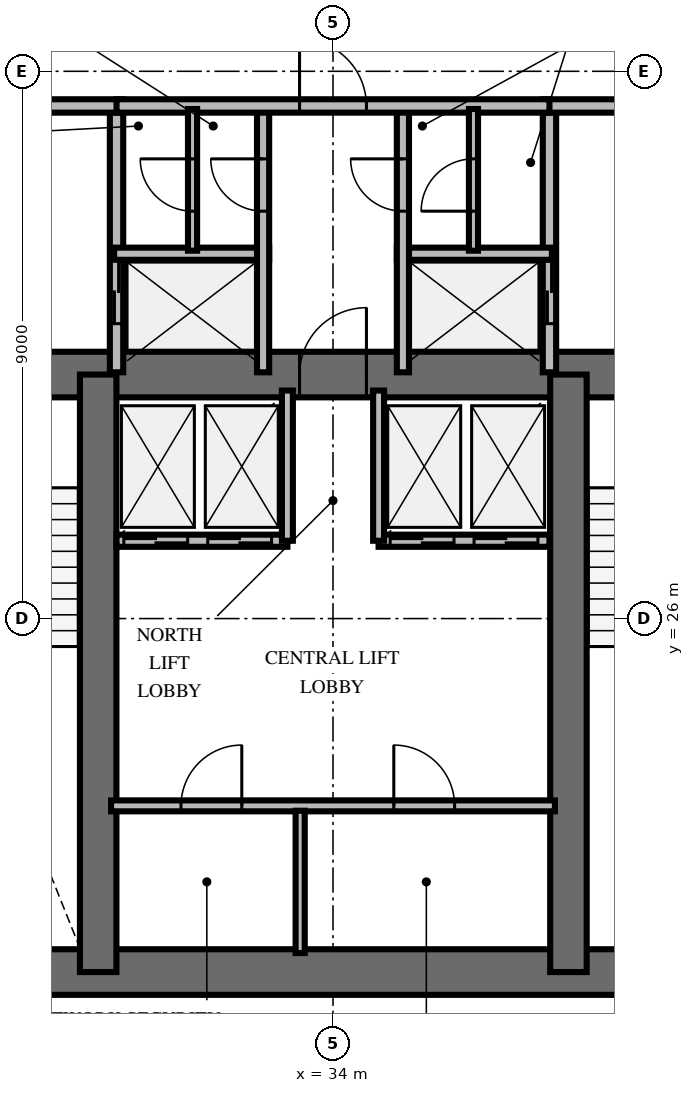
"""IFC4 building model, lengths in metres.
Left out: names, types, materials, properties, quantities, classifications, styles, units other than length and angle.
Written with IfcOpenShell. Run it as: python <this file> out.ifc"""

import sys

from ifc_helpers import new_model, si_unit, direction, frame, frame_2d, origin, place, context, subcontext, project, spatial, rectangle, extrude, element, fill, save


model = new_model("IFC4")
c1 = context("Model", 3, precision=1e-05, world=origin(), true_north=direction((0.0, 1.0)))
c2 = subcontext(c1, "Body", "Model", "MODEL_VIEW")
j1 = project(units=[si_unit("LENGTHUNIT", "METRE"), si_unit("PLANEANGLEUNIT", "RADIAN")], contexts=[c1])
p1 = place(None, origin())
s1 = spatial("IfcSite", under=j1, at=p1, CompositionType="ELEMENT")
p2 = place(p1, origin())
s2 = spatial("IfcBuilding", under=s1, at=p2, CompositionType="ELEMENT")
p3 = place(p2, frame((0.0, 0.0, 180.8)))
s3 = spatial("IfcBuildingStorey", under=s2, at=p3, CompositionType="ELEMENT", Elevation=180.8)
p4 = place(p3, frame((26.072, 20.187, 0.0), z_axis=(0.0, 0.0, 1.0), x_axis=(1.0, 0.0, 0.0)))
e1 = element("IfcWall", 1, at=p4, inside=s3, PredefinedType="SHEAR", context=c2, shape_type="SweptSolid", body=[
    extrude(rectangle(XDim=15.866, YDim=0.75, at=frame_2d((7.933, 0.0))), origin(), (0.0, 0.0, 1.0), 3.6),
])
p5 = place(p3, frame((26.072, 30.013, 0.0), z_axis=(0.0, 0.0, 1.0), x_axis=(1.0, 0.0, 0.0)))
e2 = element("IfcWall", 2, at=p5, inside=s3, PredefinedType="SHEAR", context=c2, shape_type="SweptSolid", body=[
    extrude(rectangle(XDim=15.866, YDim=0.75, at=frame_2d((7.933, 0.0))), origin(), (0.0, 0.0, 1.0), 3.6),
])
p6 = place(p5, frame((0.878, 0.0, 0.0)))
e3 = element("IfcOpeningElement", 3, at=p6, cuts=e2, PredefinedType="OPENING", context=c2, shape_type="SweptSolid", body=[
    extrude(rectangle(XDim=1.05, YDim=2.15, at=frame_2d((0.525, 1.075))), frame((0.0, 0.385, 0.0), z_axis=(0.0, -1.0, 0.0), x_axis=(1.0, 0.0, 0.0)), (0.0, 0.0, 1.0), 0.77),
])
p7 = place(p5, frame((13.928, 0.0, 0.0)))
e4 = element("IfcOpeningElement", 4, at=p7, cuts=e2, PredefinedType="OPENING", context=c2, shape_type="SweptSolid", body=[
    extrude(rectangle(XDim=1.05, YDim=2.15, at=frame_2d((0.525, 1.075))), frame((0.0, 0.385, 0.0), z_axis=(0.0, -1.0, 0.0), x_axis=(1.0, 0.0, 0.0)), (0.0, 0.0, 1.0), 0.77),
])
p8 = place(p5, frame((7.378, 0.0, 0.0)))
e5 = element("IfcOpeningElement", 5, at=p8, cuts=e2, PredefinedType="OPENING", context=c2, shape_type="SweptSolid", body=[
    extrude(rectangle(XDim=1.1, YDim=2.15, at=frame_2d((0.55, 1.075))), frame((0.0, 0.385, 0.0), z_axis=(0.0, -1.0, 0.0), x_axis=(1.0, 0.0, 0.0)), (0.0, 0.0, 1.0), 0.77),
])
for number, where, z_axis, x_axis in (
    (6, (30.138, 20.187, 0.0), (0.0, 0.0, 1.0), (0.0, 1.0, 0.0)),
    (7, (37.872, 20.187, 0.0), (0.0, 0.0, 1.0), (0.0, 1.0, 0.0)),
):
    element("IfcWall", number, at=place(p3, frame(where, z_axis=z_axis, x_axis=x_axis)), inside=s3, PredefinedType="SHEAR", context=c2, shape_type="SweptSolid", body=[
        extrude(rectangle(XDim=9.826, YDim=0.6, at=frame_2d((4.913, 0.0))), origin(), (0.0, 0.0, 1.0), 3.6),
    ])
p9 = place(p3, frame((30.44, 30.05, 0.0), z_axis=(0.0, 0.0, 1.0), x_axis=(0.0, 1.0, 0.0)))
e8 = element("IfcWall", 8, at=p9, inside=s3, PredefinedType="SOLIDWALL", context=c2, shape_type="SweptSolid", body=[
    extrude(rectangle(XDim=4.38, YDim=0.22, at=frame_2d((2.19, 0.0))), origin(), (0.0, 0.0, 1.0), 2.46),
])
p10 = place(p9, frame((0.8, 0.0, 0.0)))
e9 = element("IfcOpeningElement", 9, at=p10, cuts=e8, PredefinedType="OPENING", context=c2, shape_type="SweptSolid", body=[
    extrude(rectangle(XDim=1.05, YDim=2.1, at=frame_2d((0.525, 1.05))), frame((0.0, 0.12, 0.0), z_axis=(0.0, -1.0, 0.0), x_axis=(1.0, 0.0, 0.0)), (0.0, 0.0, 1.0), 0.24),
])
p11 = place(p3, frame((26.24, 34.43, 0.0), z_axis=(0.0, 0.0, 1.0), x_axis=(1.0, 0.0, 0.0)))
e10 = element("IfcWall", 10, at=p11, inside=s3, PredefinedType="SOLIDWALL", context=c2, shape_type="SweptSolid", body=[
    extrude(rectangle(XDim=4.31, YDim=0.22, at=frame_2d((2.155, 0.0))), origin(), (0.0, 0.0, 1.0), 2.46),
])
p12 = place(p11, frame((1.6, 0.0, 0.0)))
e11 = element("IfcOpeningElement", 11, at=p12, cuts=e10, PredefinedType="OPENING", context=c2, shape_type="SweptSolid", body=[
    extrude(rectangle(XDim=1.1, YDim=2.15, at=frame_2d((0.55, 1.075))), frame((0.0, 0.12, 0.0), z_axis=(0.0, -1.0, 0.0), x_axis=(1.0, 0.0, 0.0)), (0.0, 0.0, 1.0), 0.24),
])
p13 = place(p3, frame((30.4, 32.0, 0.0), z_axis=(0.0, 0.0, 1.0), x_axis=(1.0, 0.0, 0.0)))
e12 = element("IfcWall", 12, at=p13, inside=s3, PredefinedType="SOLIDWALL", context=c2, shape_type="SweptSolid", body=[
    extrude(rectangle(XDim=2.55, YDim=0.2, at=frame_2d((1.275, 0.0))), origin(), (0.0, 0.0, 1.0), 2.46),
])
p14 = place(p3, frame((32.85, 30.05, 0.0), z_axis=(0.0, 0.0, 1.0), x_axis=(0.0, 1.0, 0.0)))
e13 = element("IfcWall", 13, at=p14, inside=s3, PredefinedType="SOLIDWALL", context=c2, shape_type="SweptSolid", body=[
    extrude(rectangle(XDim=4.38, YDim=0.2, at=frame_2d((2.19, 0.0))), origin(), (0.0, 0.0, 1.0), 2.46),
])
p15 = place(p14, frame((2.65, 0.0, 0.0)))
e14 = element("IfcOpeningElement", 14, at=p15, cuts=e13, PredefinedType="OPENING", context=c2, shape_type="SweptSolid", body=[
    extrude(rectangle(XDim=0.86, YDim=2.05, at=frame_2d((0.43, 1.025))), frame((0.0, 0.11, 0.0), z_axis=(0.0, -1.0, 0.0), x_axis=(1.0, 0.0, 0.0)), (0.0, 0.0, 1.0), 0.22),
])
p16 = place(p3, frame((37.56, 30.05, 0.0), z_axis=(0.0, 0.0, 1.0), x_axis=(0.0, 1.0, 0.0)))
e15 = element("IfcWall", 15, at=p16, inside=s3, PredefinedType="SOLIDWALL", context=c2, shape_type="SweptSolid", body=[
    extrude(rectangle(XDim=4.38, YDim=0.22, at=frame_2d((2.19, 0.0))), origin(), (0.0, 0.0, 1.0), 2.46),
])
p17 = place(p16, frame((0.8, 0.0, 0.0)))
e16 = element("IfcOpeningElement", 16, at=p17, cuts=e15, PredefinedType="OPENING", context=c2, shape_type="SweptSolid", body=[
    extrude(rectangle(XDim=1.05, YDim=2.1, at=frame_2d((0.525, 1.05))), frame((0.0, 0.12, 0.0), z_axis=(0.0, -1.0, 0.0), x_axis=(1.0, 0.0, 0.0)), (0.0, 0.0, 1.0), 0.24),
])
p18 = place(p3, frame((37.45, 34.43, 0.0), z_axis=(0.0, 0.0, 1.0), x_axis=(1.0, 0.0, 0.0)))
e17 = element("IfcWall", 17, at=p18, inside=s3, PredefinedType="SOLIDWALL", context=c2, shape_type="SweptSolid", body=[
    extrude(rectangle(XDim=4.31, YDim=0.22, at=frame_2d((2.155, 0.0))), origin(), (0.0, 0.0, 1.0), 2.46),
])
p19 = place(p18, frame((1.6, 0.0, 0.0)))
e18 = element("IfcOpeningElement", 18, at=p19, cuts=e17, PredefinedType="OPENING", context=c2, shape_type="SweptSolid", body=[
    extrude(rectangle(XDim=1.1, YDim=2.15, at=frame_2d((0.55, 1.075))), frame((0.0, 0.12, 0.0), z_axis=(0.0, -1.0, 0.0), x_axis=(1.0, 0.0, 0.0)), (0.0, 0.0, 1.0), 0.24),
])
p20 = place(p3, frame((35.05, 32.0, 0.0), z_axis=(0.0, 0.0, 1.0), x_axis=(1.0, 0.0, 0.0)))
e19 = element("IfcWall", 19, at=p20, inside=s3, PredefinedType="SOLIDWALL", context=c2, shape_type="SweptSolid", body=[
    extrude(rectangle(XDim=2.55, YDim=0.2, at=frame_2d((1.275, 0.0))), origin(), (0.0, 0.0, 1.0), 2.46),
])
p21 = place(p3, frame((35.15, 30.05, 0.0), z_axis=(0.0, 0.0, 1.0), x_axis=(0.0, 1.0, 0.0)))
e20 = element("IfcWall", 20, at=p21, inside=s3, PredefinedType="SOLIDWALL", context=c2, shape_type="SweptSolid", body=[
    extrude(rectangle(XDim=4.38, YDim=0.2, at=frame_2d((2.19, 0.0))), origin(), (0.0, 0.0, 1.0), 2.46),
])
p22 = place(p21, frame((2.65, 0.0, 0.0)))
e21 = element("IfcOpeningElement", 21, at=p22, cuts=e20, PredefinedType="OPENING", context=c2, shape_type="SweptSolid", body=[
    extrude(rectangle(XDim=0.86, YDim=2.05, at=frame_2d((0.43, 1.025))), frame((0.0, 0.11, 0.0), z_axis=(0.0, -1.0, 0.0), x_axis=(1.0, 0.0, 0.0)), (0.0, 0.0, 1.0), 0.22),
])
p23 = place(p3, frame((30.44, 34.43, 0.0), z_axis=(0.0, 0.0, 1.0), x_axis=(1.0, 0.0, 0.0)))
e22 = element("IfcWall", 22, at=p23, inside=s3, PredefinedType="SOLIDWALL", context=c2, shape_type="SweptSolid", body=[
    extrude(rectangle(XDim=7.12, YDim=0.22, at=frame_2d((3.56, 0.0))), origin(), (0.0, 0.0, 1.0), 2.46),
])
p24 = place(p23, frame((3.01, 0.0, 0.0)))
e23 = element("IfcOpeningElement", 23, at=p24, cuts=e22, PredefinedType="OPENING", context=c2, shape_type="SweptSolid", body=[
    extrude(rectangle(XDim=1.1, YDim=2.15, at=frame_2d((0.55, 1.075))), frame((0.0, 0.12, 0.0), z_axis=(0.0, -1.0, 0.0), x_axis=(1.0, 0.0, 0.0)), (0.0, 0.0, 1.0), 0.24),
])
p25 = place(p3, frame((31.69, 32.05, 0.0), z_axis=(0.0, 0.0, 1.0), x_axis=(0.0, 1.0, 0.0)))
e24 = element("IfcWall", 24, at=p25, inside=s3, PredefinedType="PARTITIONING", context=c2, shape_type="SweptSolid", body=[
    extrude(rectangle(XDim=2.33, YDim=0.15, at=frame_2d((1.165, 0.0))), origin(), (0.0, 0.0, 1.0), 2.46),
])
p26 = place(p25, frame((0.65, 0.0, 0.0)))
e25 = element("IfcOpeningElement", 25, at=p26, cuts=e24, PredefinedType="OPENING", context=c2, shape_type="SweptSolid", body=[
    extrude(rectangle(XDim=0.86, YDim=2.05, at=frame_2d((0.43, 1.025))), frame((0.0, 0.085, 0.0), z_axis=(0.0, -1.0, 0.0), x_axis=(1.0, 0.0, 0.0)), (0.0, 0.0, 1.0), 0.17),
])
p27 = place(p3, frame((36.31, 32.05, 0.0), z_axis=(0.0, 0.0, 1.0), x_axis=(0.0, 1.0, 0.0)))
e26 = element("IfcWall", 26, at=p27, inside=s3, PredefinedType="PARTITIONING", context=c2, shape_type="SweptSolid", body=[
    extrude(rectangle(XDim=2.33, YDim=0.15, at=frame_2d((1.165, 0.0))), origin(), (0.0, 0.0, 1.0), 2.46),
])
p28 = place(p27, frame((0.65, 0.0, 0.0)))
e27 = element("IfcOpeningElement", 27, at=p28, cuts=e26, PredefinedType="OPENING", context=c2, shape_type="SweptSolid", body=[
    extrude(rectangle(XDim=0.86, YDim=2.05, at=frame_2d((0.43, 1.025))), frame((0.0, 0.085, 0.0), z_axis=(0.0, -1.0, 0.0), x_axis=(1.0, 0.0, 0.0)), (0.0, 0.0, 1.0), 0.17),
])
p29 = place(p3, frame((30.35, 22.92, 0.0), z_axis=(0.0, 0.0, 1.0), x_axis=(1.0, 0.0, 0.0)))
e28 = element("IfcWall", 28, at=p29, inside=s3, PredefinedType="PARTITIONING", context=c2, shape_type="SweptSolid", body=[
    extrude(rectangle(XDim=7.3, YDim=0.18, at=frame_2d((3.65, 0.0))), origin(), (0.0, 0.0, 1.0), 2.46),
])
p30 = place(p29, frame((1.15, 0.0, 0.0)))
e29 = element("IfcOpeningElement", 29, at=p30, cuts=e28, PredefinedType="OPENING", context=c2, shape_type="SweptSolid", body=[
    extrude(rectangle(XDim=1.0, YDim=2.15, at=frame_2d((0.5, 1.075))), frame((0.0, 0.1, 0.0), z_axis=(0.0, -1.0, 0.0), x_axis=(1.0, 0.0, 0.0)), (0.0, 0.0, 1.0), 0.2),
])
p31 = place(p29, frame((4.65, 0.0, 0.0)))
e30 = element("IfcOpeningElement", 30, at=p31, cuts=e28, PredefinedType="OPENING", context=c2, shape_type="SweptSolid", body=[
    extrude(rectangle(XDim=1.0, YDim=2.15, at=frame_2d((0.5, 1.075))), frame((0.0, 0.1, 0.0), z_axis=(0.0, -1.0, 0.0), x_axis=(1.0, 0.0, 0.0)), (0.0, 0.0, 1.0), 0.2),
])
p32 = place(p3, frame((33.46, 20.5, 0.0), z_axis=(0.0, 0.0, 1.0), x_axis=(0.0, 1.0, 0.0)))
e31 = element("IfcWall", 31, at=p32, inside=s3, PredefinedType="PARTITIONING", context=c2, shape_type="SweptSolid", body=[
    extrude(rectangle(XDim=2.34, YDim=0.15, at=frame_2d((1.17, 0.0))), origin(), (0.0, 0.0, 1.0), 2.46),
])
p33 = place(p3, frame((30.44, 27.28, 0.0), z_axis=(0.0, 0.0, 1.0), x_axis=(1.0, 0.0, 0.0)))
e32 = element("IfcWall", 32, at=p33, inside=s3, PredefinedType="SOLIDWALL", context=c2, shape_type="SweptSolid", body=[
    extrude(rectangle(XDim=2.81, YDim=0.2, at=frame_2d((1.405, 0.0))), origin(), (0.0, 0.0, 1.0), 2.46),
])
p34 = place(p33, frame((0.12, 0.0, 0.0)))
e33 = element("IfcOpeningElement", 33, at=p34, cuts=e32, PredefinedType="OPENING", context=c2, shape_type="SweptSolid", body=[
    extrude(rectangle(XDim=1.05, YDim=2.1, at=frame_2d((0.525, 1.05))), frame((0.0, 0.11, 0.0), z_axis=(0.0, -1.0, 0.0), x_axis=(1.0, 0.0, 0.0)), (0.0, 0.0, 1.0), 0.22),
])
p35 = place(p33, frame((1.5, 0.0, 0.0)))
e34 = element("IfcOpeningElement", 34, at=p35, cuts=e32, PredefinedType="OPENING", context=c2, shape_type="SweptSolid", body=[
    extrude(rectangle(XDim=1.05, YDim=2.1, at=frame_2d((0.525, 1.05))), frame((0.0, 0.11, 0.0), z_axis=(0.0, -1.0, 0.0), x_axis=(1.0, 0.0, 0.0)), (0.0, 0.0, 1.0), 0.22),
])
p36 = place(p3, frame((33.25, 27.28, 0.0), z_axis=(0.0, 0.0, 1.0), x_axis=(0.0, 1.0, 0.0)))
e35 = element("IfcWall", 35, at=p36, inside=s3, PredefinedType="SOLIDWALL", context=c2, shape_type="SweptSolid", body=[
    extrude(rectangle(XDim=2.47, YDim=0.18, at=frame_2d((1.235, 0.0))), origin(), (0.0, 0.0, 1.0), 2.46),
])
p37 = place(p3, frame((34.75, 27.28, 0.0), z_axis=(0.0, 0.0, 1.0), x_axis=(1.0, 0.0, 0.0)))
e36 = element("IfcWall", 36, at=p37, inside=s3, PredefinedType="SOLIDWALL", context=c2, shape_type="SweptSolid", body=[
    extrude(rectangle(XDim=2.81, YDim=0.2, at=frame_2d((1.405, 0.0))), origin(), (0.0, 0.0, 1.0), 2.46),
])
p38 = place(p37, frame((0.19, 0.0, 0.0)))
e37 = element("IfcOpeningElement", 37, at=p38, cuts=e36, PredefinedType="OPENING", context=c2, shape_type="SweptSolid", body=[
    extrude(rectangle(XDim=1.05, YDim=2.1, at=frame_2d((0.525, 1.05))), frame((0.0, 0.11, 0.0), z_axis=(0.0, -1.0, 0.0), x_axis=(1.0, 0.0, 0.0)), (0.0, 0.0, 1.0), 0.22),
])
p39 = place(p37, frame((1.57, 0.0, 0.0)))
e38 = element("IfcOpeningElement", 38, at=p39, cuts=e36, PredefinedType="OPENING", context=c2, shape_type="SweptSolid", body=[
    extrude(rectangle(XDim=1.05, YDim=2.1, at=frame_2d((0.525, 1.05))), frame((0.0, 0.11, 0.0), z_axis=(0.0, -1.0, 0.0), x_axis=(1.0, 0.0, 0.0)), (0.0, 0.0, 1.0), 0.22),
])
p40 = place(p3, frame((34.75, 27.28, 0.0), z_axis=(0.0, 0.0, 1.0), x_axis=(0.0, 1.0, 0.0)))
e39 = element("IfcWall", 39, at=p40, inside=s3, PredefinedType="SOLIDWALL", context=c2, shape_type="SweptSolid", body=[
    extrude(rectangle(XDim=2.47, YDim=0.18, at=frame_2d((1.235, 0.0))), origin(), (0.0, 0.0, 1.0), 2.46),
])
p41 = place(p3, frame((27.5, 35.28, 0.0), z_axis=(0.0, 0.0, 1.0), x_axis=(0.953691418528, 0.300786765376, 0.0)))
e40 = element("IfcWall", 40, at=p41, inside=s3, PredefinedType="PARTITIONING", context=c2, shape_type="SweptSolid", body=[
    extrude(rectangle(XDim=6.816, YDim=0.18, at=frame_2d((3.408, 0.0))), origin(), (0.0, 0.0, 1.0), 2.46),
])
p42 = place(p41, frame((2.858, 0.0, 0.0)))
e41 = element("IfcOpeningElement", 41, at=p42, cuts=e40, PredefinedType="OPENING", context=c2, shape_type="SweptSolid", body=[
    extrude(rectangle(XDim=1.1, YDim=2.15, at=frame_2d((0.55, 1.075))), frame((0.0, 0.1, 0.0), z_axis=(0.0, -1.0, 0.0), x_axis=(1.0, 0.0, 0.0)), (0.0, 0.0, 1.0), 0.2),
])
p43 = place(p3, frame((34.0, 37.33, 0.0), z_axis=(0.0, 0.0, 1.0), x_axis=(0.953691418528, -0.300786765376, 0.0)))
e42 = element("IfcWall", 42, at=p43, inside=s3, PredefinedType="PARTITIONING", context=c2, shape_type="SweptSolid", body=[
    extrude(rectangle(XDim=6.816, YDim=0.18, at=frame_2d((3.408, 0.0))), origin(), (0.0, 0.0, 1.0), 2.46),
])
p44 = place(p43, frame((2.858, 0.0, 0.0)))
e43 = element("IfcOpeningElement", 43, at=p44, cuts=e42, PredefinedType="OPENING", context=c2, shape_type="SweptSolid", body=[
    extrude(rectangle(XDim=1.1, YDim=2.15, at=frame_2d((0.55, 1.075))), frame((0.0, 0.1, 0.0), z_axis=(0.0, -1.0, 0.0), x_axis=(1.0, 0.0, 0.0)), (0.0, 0.0, 1.0), 0.2),
])
p45 = place(p8, origin())
e44 = element("IfcDoor", 44, at=p45, inside=s3, OperationType="SINGLE_SWING_RIGHT", PredefinedType="DOOR", context=c2, shape_type="SweptSolid", body=[
    extrude(rectangle(XDim=1.1, YDim=2.15, at=frame_2d((0.55, 1.075))), frame((0.0, 0.025, 0.0), z_axis=(0.0, -1.0, 0.0), x_axis=(1.0, 0.0, 0.0)), (0.0, 0.0, 1.0), 0.05),
])
fill(e5, e44)
p46 = place(p10, origin())
e45 = element("IfcDoor", 45, at=p46, inside=s3, OperationType="DOUBLE_DOOR_SLIDING", PredefinedType="USERDEFINED", context=c2, shape_type="SweptSolid", body=[
    extrude(rectangle(XDim=1.05, YDim=2.1, at=frame_2d((0.525, 1.05))), frame((0.0, 0.025, 0.0), z_axis=(0.0, -1.0, 0.0), x_axis=(1.0, 0.0, 0.0)), (0.0, 0.0, 1.0), 0.05),
])
fill(e9, e45)
p47 = place(p15, origin())
e46 = element("IfcDoor", 46, at=p47, inside=s3, OperationType="SINGLE_SWING_RIGHT", PredefinedType="TRAPDOOR", context=c2, shape_type="SweptSolid", body=[
    extrude(rectangle(XDim=0.86, YDim=2.05, at=frame_2d((0.43, 1.025))), frame((0.0, 0.025, 0.0), z_axis=(0.0, -1.0, 0.0), x_axis=(1.0, 0.0, 0.0)), (0.0, 0.0, 1.0), 0.05),
])
fill(e14, e46)
p48 = place(p17, origin())
e47 = element("IfcDoor", 47, at=p48, inside=s3, OperationType="DOUBLE_DOOR_SLIDING", PredefinedType="USERDEFINED", context=c2, shape_type="SweptSolid", body=[
    extrude(rectangle(XDim=1.05, YDim=2.1, at=frame_2d((0.525, 1.05))), frame((0.0, 0.025, 0.0), z_axis=(0.0, -1.0, 0.0), x_axis=(1.0, 0.0, 0.0)), (0.0, 0.0, 1.0), 0.05),
])
fill(e16, e47)
p49 = place(p22, origin())
e48 = element("IfcDoor", 48, at=p49, inside=s3, OperationType="SINGLE_SWING_RIGHT", PredefinedType="TRAPDOOR", context=c2, shape_type="SweptSolid", body=[
    extrude(rectangle(XDim=0.86, YDim=2.05, at=frame_2d((0.43, 1.025))), frame((0.0, 0.025, 0.0), z_axis=(0.0, -1.0, 0.0), x_axis=(1.0, 0.0, 0.0)), (0.0, 0.0, 1.0), 0.05),
])
fill(e21, e48)
p50 = place(p24, origin())
e49 = element("IfcDoor", 49, at=p50, inside=s3, OperationType="SINGLE_SWING_LEFT", PredefinedType="DOOR", context=c2, shape_type="SweptSolid", body=[
    extrude(rectangle(XDim=1.1, YDim=2.15, at=frame_2d((0.55, 1.075))), frame((0.0, 0.025, 0.0), z_axis=(0.0, -1.0, 0.0), x_axis=(1.0, 0.0, 0.0)), (0.0, 0.0, 1.0), 0.05),
])
fill(e23, e49)
p51 = place(p26, origin())
e50 = element("IfcDoor", 50, at=p51, inside=s3, OperationType="SINGLE_SWING_RIGHT", PredefinedType="TRAPDOOR", context=c2, shape_type="SweptSolid", body=[
    extrude(rectangle(XDim=0.86, YDim=2.05, at=frame_2d((0.43, 1.025))), frame((0.0, 0.025, 0.0), z_axis=(0.0, -1.0, 0.0), x_axis=(1.0, 0.0, 0.0)), (0.0, 0.0, 1.0), 0.05),
])
fill(e25, e50)
p52 = place(p28, origin())
e51 = element("IfcDoor", 51, at=p52, inside=s3, OperationType="SINGLE_SWING_LEFT", PredefinedType="TRAPDOOR", context=c2, shape_type="SweptSolid", body=[
    extrude(rectangle(XDim=0.86, YDim=2.05, at=frame_2d((0.43, 1.025))), frame((0.0, 0.025, 0.0), z_axis=(0.0, -1.0, 0.0), x_axis=(1.0, 0.0, 0.0)), (0.0, 0.0, 1.0), 0.05),
])
fill(e27, e51)
p53 = place(p30, origin())
e52 = element("IfcDoor", 52, at=p53, inside=s3, OperationType="SINGLE_SWING_RIGHT", PredefinedType="DOOR", context=c2, shape_type="SweptSolid", body=[
    extrude(rectangle(XDim=1.0, YDim=2.15, at=frame_2d((0.5, 1.075))), frame((0.0, 0.025, 0.0), z_axis=(0.0, -1.0, 0.0), x_axis=(1.0, 0.0, 0.0)), (0.0, 0.0, 1.0), 0.05),
])
fill(e29, e52)
p54 = place(p31, origin())
e53 = element("IfcDoor", 53, at=p54, inside=s3, OperationType="SINGLE_SWING_LEFT", PredefinedType="DOOR", context=c2, shape_type="SweptSolid", body=[
    extrude(rectangle(XDim=1.0, YDim=2.15, at=frame_2d((0.5, 1.075))), frame((0.0, 0.025, 0.0), z_axis=(0.0, -1.0, 0.0), x_axis=(1.0, 0.0, 0.0)), (0.0, 0.0, 1.0), 0.05),
])
fill(e30, e53)
p55 = place(p34, origin())
e54 = element("IfcDoor", 54, at=p55, inside=s3, OperationType="DOUBLE_DOOR_SLIDING", PredefinedType="USERDEFINED", context=c2, shape_type="SweptSolid", body=[
    extrude(rectangle(XDim=1.05, YDim=2.1, at=frame_2d((0.525, 1.05))), frame((0.0, 0.025, 0.0), z_axis=(0.0, -1.0, 0.0), x_axis=(1.0, 0.0, 0.0)), (0.0, 0.0, 1.0), 0.05),
])
fill(e33, e54)
p56 = place(p35, origin())
e55 = element("IfcDoor", 55, at=p56, inside=s3, OperationType="DOUBLE_DOOR_SLIDING", PredefinedType="USERDEFINED", context=c2, shape_type="SweptSolid", body=[
    extrude(rectangle(XDim=1.05, YDim=2.1, at=frame_2d((0.525, 1.05))), frame((0.0, 0.025, 0.0), z_axis=(0.0, -1.0, 0.0), x_axis=(1.0, 0.0, 0.0)), (0.0, 0.0, 1.0), 0.05),
])
fill(e34, e55)
p57 = place(p38, origin())
e56 = element("IfcDoor", 56, at=p57, inside=s3, OperationType="DOUBLE_DOOR_SLIDING", PredefinedType="USERDEFINED", context=c2, shape_type="SweptSolid", body=[
    extrude(rectangle(XDim=1.05, YDim=2.1, at=frame_2d((0.525, 1.05))), frame((0.0, 0.025, 0.0), z_axis=(0.0, -1.0, 0.0), x_axis=(1.0, 0.0, 0.0)), (0.0, 0.0, 1.0), 0.05),
])
fill(e37, e56)
p58 = place(p39, origin())
e57 = element("IfcDoor", 57, at=p58, inside=s3, OperationType="DOUBLE_DOOR_SLIDING", PredefinedType="USERDEFINED", context=c2, shape_type="SweptSolid", body=[
    extrude(rectangle(XDim=1.05, YDim=2.1, at=frame_2d((0.525, 1.05))), frame((0.0, 0.025, 0.0), z_axis=(0.0, -1.0, 0.0), x_axis=(1.0, 0.0, 0.0)), (0.0, 0.0, 1.0), 0.05),
])
fill(e38, e57)
save(model, sys.argv[1])
